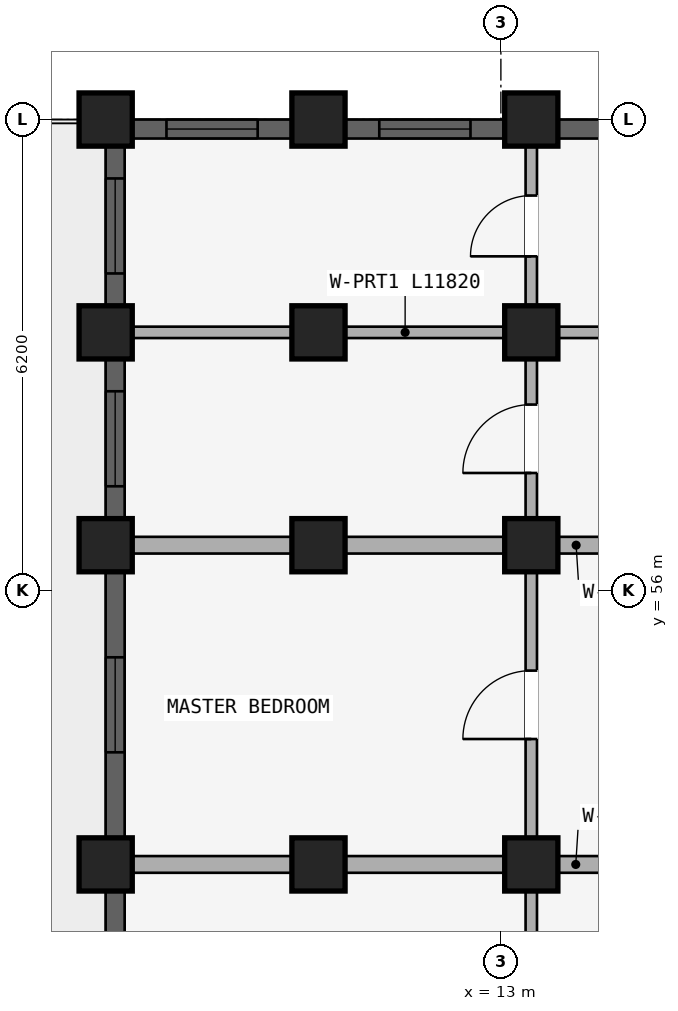
"""IFC4 building model, lengths in metres.
Left out: names, types, materials, properties, quantities, classifications, styles, units other than length and angle.
Written with IfcOpenShell. Run it as: python <this file> out.ifc"""

import sys

from ifc_helpers import new_model, si_unit, direction, frame, frame_2d, origin, origin_2d, place, context, subcontext, project, spatial, rectangle, extrude, element, fill, save


model = new_model("IFC4")
c1 = context("Model", 3, precision=1e-05, world=origin(), true_north=direction((0.0, 1.0)))
c2 = subcontext(c1, "Body", "Model", "MODEL_VIEW")
j1 = project(units=[si_unit("LENGTHUNIT", "METRE"), si_unit("PLANEANGLEUNIT", "RADIAN")], contexts=[c1])
p1 = place(None, origin())
s1 = spatial("IfcSite", under=j1, at=p1, CompositionType="ELEMENT")
p2 = place(p1, origin())
s2 = spatial("IfcBuilding", under=s1, at=p2, CompositionType="ELEMENT")
p3 = place(p2, frame((0.0, 0.0, 24.45)))
s3 = spatial("IfcBuildingStorey", under=s2, at=p3, CompositionType="ELEMENT", Elevation=24.45)
for number, where, z_axis, x_axis in (
    (1, (13.4, 52.4, 0.0), (0.0, 0.0, 1.0), (1.0, 0.0, 0.0)),
    (2, (10.6, 52.4, 0.0), (0.0, 0.0, 1.0), (1.0, 0.0, 0.0)),
):
    element("IfcColumn", number, at=place(p3, frame(where, z_axis=z_axis, x_axis=x_axis)), inside=s3, PredefinedType="COLUMN", context=c2, shape_type="SweptSolid", body=[
        extrude(rectangle(XDim=0.7, YDim=0.7, at=origin_2d()), origin(), (0.0, 0.0, 1.0), 2.93),
    ])
p4 = place(p3, frame((7.8, 52.4, 0.0), z_axis=(0.0, 0.0, 1.0), x_axis=(1.0, 0.0, 0.0)))
e3 = element("IfcColumn", 3, at=p4, inside=s3, PredefinedType="COLUMN", context=c2, shape_type="SweptSolid", body=[
    extrude(rectangle(XDim=0.7, YDim=0.7, at=origin_2d()), origin(), (0.0, 0.0, 1.0), 2.97),
])
for number, where, z_axis, x_axis in (
    (4, (13.4, 56.6, 0.0), (0.0, 0.0, 1.0), (1.0, 0.0, 0.0)),
    (5, (10.6, 56.6, 0.0), (0.0, 0.0, 1.0), (1.0, 0.0, 0.0)),
):
    element("IfcColumn", number, at=place(p3, frame(where, z_axis=z_axis, x_axis=x_axis)), inside=s3, PredefinedType="COLUMN", context=c2, shape_type="SweptSolid", body=[
        extrude(rectangle(XDim=0.7, YDim=0.7, at=origin_2d()), origin(), (0.0, 0.0, 1.0), 2.93),
    ])
p5 = place(p3, frame((7.8, 56.6, 0.0), z_axis=(0.0, 0.0, 1.0), x_axis=(1.0, 0.0, 0.0)))
e6 = element("IfcColumn", 6, at=p5, inside=s3, PredefinedType="COLUMN", context=c2, shape_type="SweptSolid", body=[
    extrude(rectangle(XDim=0.7, YDim=0.7, at=origin_2d()), origin(), (0.0, 0.0, 1.0), 2.97),
])
for number, where, z_axis, x_axis in (
    (7, (13.4, 59.4, 0.0), (0.0, 0.0, 1.0), (1.0, 0.0, 0.0)),
    (8, (10.6, 59.4, 0.0), (0.0, 0.0, 1.0), (1.0, 0.0, 0.0)),
):
    element("IfcColumn", number, at=place(p3, frame(where, z_axis=z_axis, x_axis=x_axis)), inside=s3, PredefinedType="COLUMN", context=c2, shape_type="SweptSolid", body=[
        extrude(rectangle(XDim=0.7, YDim=0.7, at=origin_2d()), origin(), (0.0, 0.0, 1.0), 2.93),
    ])
p6 = place(p3, frame((7.8, 59.4, 0.0), z_axis=(0.0, 0.0, 1.0), x_axis=(1.0, 0.0, 0.0)))
e9 = element("IfcColumn", 9, at=p6, inside=s3, PredefinedType="COLUMN", context=c2, shape_type="SweptSolid", body=[
    extrude(rectangle(XDim=0.7, YDim=0.7, at=origin_2d()), origin(), (0.0, 0.0, 1.0), 2.97),
])
for number, where, z_axis, x_axis in (
    (10, (13.4, 62.2, 0.0), (0.0, 0.0, 1.0), (1.0, 0.0, 0.0)),
    (11, (10.6, 62.2, 0.0), (0.0, 0.0, 1.0), (1.0, 0.0, 0.0)),
):
    element("IfcColumn", number, at=place(p3, frame(where, z_axis=z_axis, x_axis=x_axis)), inside=s3, PredefinedType="COLUMN", context=c2, shape_type="SweptSolid", body=[
        extrude(rectangle(XDim=0.7, YDim=0.7, at=origin_2d()), origin(), (0.0, 0.0, 1.0), 2.93),
    ])
p7 = place(p3, frame((7.8, 62.2, 0.0), z_axis=(0.0, 0.0, 1.0), x_axis=(1.0, 0.0, 0.0)))
e12 = element("IfcColumn", 12, at=p7, inside=s3, PredefinedType="COLUMN", context=c2, shape_type="SweptSolid", body=[
    extrude(rectangle(XDim=0.7, YDim=0.7, at=origin_2d()), origin(), (0.0, 0.0, 1.0), 2.97),
])
p8 = place(p3, frame((13.4, 48.43, 0.0), z_axis=(0.0, 0.0, 1.0), x_axis=(0.0, 1.0, 0.0)))
e13 = element("IfcWall", 13, at=p8, inside=s3, PredefinedType="PARTITIONING", context=c2, shape_type="SweptSolid", body=[
    extrude(rectangle(XDim=3.89, YDim=0.15, at=frame_2d((1.945, 0.0))), origin(), (0.0, 0.0, 1.0), 2.372),
])
p9 = place(p8, frame((1.495, 0.0, 0.0)))
e14 = element("IfcOpeningElement", 14, at=p9, cuts=e13, PredefinedType="OPENING", context=c2, shape_type="SweptSolid", body=[
    extrude(rectangle(XDim=0.9, YDim=2.1, at=frame_2d((0.45, 1.05))), frame((0.0, 0.085, 0.0), z_axis=(0.0, -1.0, 0.0), x_axis=(1.0, 0.0, 0.0)), (0.0, 0.0, 1.0), 0.17),
])
p10 = place(p3, frame((13.4, 52.48, 0.0), z_axis=(0.0, 0.0, 1.0), x_axis=(0.0, 1.0, 0.0)))
e15 = element("IfcWall", 15, at=p10, inside=s3, PredefinedType="PARTITIONING", context=c2, shape_type="SweptSolid", body=[
    extrude(rectangle(XDim=4.04, YDim=0.15, at=frame_2d((2.02, 0.0))), origin(), (0.0, 0.0, 1.0), 2.372),
])
p11 = place(p10, frame((1.57, 0.0, 0.0)))
e16 = element("IfcOpeningElement", 16, at=p11, cuts=e15, PredefinedType="OPENING", context=c2, shape_type="SweptSolid", body=[
    extrude(rectangle(XDim=0.9, YDim=2.1, at=frame_2d((0.45, 1.05))), frame((0.0, 0.085, 0.0), z_axis=(0.0, -1.0, 0.0), x_axis=(1.0, 0.0, 0.0)), (0.0, 0.0, 1.0), 0.17),
])
p12 = place(p3, frame((19.95, 52.4, 0.0), z_axis=(0.0, 0.0, 1.0), x_axis=(-1.0, 0.0, 0.0)))
e17 = element("IfcWall", 17, at=p12, inside=s3, PredefinedType="STANDARD", context=c2, shape_type="SweptSolid", body=[
    extrude(rectangle(XDim=11.93, YDim=0.22, at=frame_2d((5.965, 0.0))), origin(), (0.0, 0.0, 1.0), 2.372),
])
p13 = place(p3, frame((13.4, 56.68, 0.0), z_axis=(0.0, 0.0, 1.0), x_axis=(0.0, 1.0, 0.0)))
e18 = element("IfcWall", 18, at=p13, inside=s3, PredefinedType="PLUMBINGWALL", context=c2, shape_type="SweptSolid", body=[
    extrude(rectangle(XDim=2.64, YDim=0.15, at=frame_2d((1.32, 0.0))), origin(), (0.0, 0.0, 1.0), 2.372),
])
p14 = place(p13, frame((0.87, 0.0, 0.0)))
e19 = element("IfcOpeningElement", 19, at=p14, cuts=e18, PredefinedType="OPENING", context=c2, shape_type="SweptSolid", body=[
    extrude(rectangle(XDim=0.9, YDim=2.1, at=frame_2d((0.45, 1.05))), frame((0.0, 0.085, 0.0), z_axis=(0.0, -1.0, 0.0), x_axis=(1.0, 0.0, 0.0)), (0.0, 0.0, 1.0), 0.17),
])
p15 = place(p3, frame((19.9, 56.6, 0.0), z_axis=(0.0, 0.0, 1.0), x_axis=(-1.0, 0.0, 0.0)))
e20 = element("IfcWall", 20, at=p15, inside=s3, PredefinedType="STANDARD", context=c2, shape_type="SweptSolid", body=[
    extrude(rectangle(XDim=11.82, YDim=0.22, at=frame_2d((5.91, 0.0))), origin(), (0.0, 0.0, 1.0), 2.372),
])
p16 = place(p3, frame((13.4, 59.48, 0.0), z_axis=(0.0, 0.0, 1.0), x_axis=(0.0, 1.0, 0.0)))
e21 = element("IfcWall", 21, at=p16, inside=s3, PredefinedType="PLUMBINGWALL", context=c2, shape_type="SweptSolid", body=[
    extrude(rectangle(XDim=2.64, YDim=0.15, at=frame_2d((1.32, 0.0))), origin(), (0.0, 0.0, 1.0), 2.372),
])
p17 = place(p16, frame((0.92, 0.0, 0.0)))
e22 = element("IfcOpeningElement", 22, at=p17, cuts=e21, PredefinedType="OPENING", context=c2, shape_type="SweptSolid", body=[
    extrude(rectangle(XDim=0.8, YDim=2.1, at=frame_2d((0.4, 1.05))), frame((0.0, 0.085, 0.0), z_axis=(0.0, -1.0, 0.0), x_axis=(1.0, 0.0, 0.0)), (0.0, 0.0, 1.0), 0.17),
])
p18 = place(p3, frame((19.9, 59.4, 0.0), z_axis=(0.0, 0.0, 1.0), x_axis=(-1.0, 0.0, 0.0)))
e23 = element("IfcWall", 23, at=p18, inside=s3, PredefinedType="PARTITIONING", context=c2, shape_type="SweptSolid", body=[
    extrude(rectangle(XDim=11.82, YDim=0.15, at=frame_2d((5.91, 0.0))), origin(), (0.0, 0.0, 1.0), 2.372),
])
p19 = place(p18, frame((2.75, 0.0, 0.0)))
e24 = element("IfcOpeningElement", 24, at=p19, cuts=e23, PredefinedType="OPENING", context=c2, shape_type="SweptSolid", body=[
    extrude(rectangle(XDim=0.9, YDim=2.1, at=frame_2d((0.45, 1.05))), frame((0.0, 0.085, 0.0), z_axis=(0.0, -1.0, 0.0), x_axis=(1.0, 0.0, 0.0)), (0.0, 0.0, 1.0), 0.17),
])
p20 = place(p3, frame((7.925, 48.553, 0.0), z_axis=(0.0, 0.0, 1.0), x_axis=(0.0, 1.0, 0.0)))
e25 = element("IfcWall", 25, at=p20, inside=s3, PredefinedType="STANDARD", context=c2, shape_type="SweptSolid", body=[
    extrude(rectangle(XDim=3.493, YDim=0.25, at=frame_2d((1.747, 0.0))), origin(), (0.0, 0.0, 1.0), 2.48),
])
p21 = place(p20, frame((1.122, 0.0, 0.73)))
e26 = element("IfcOpeningElement", 26, at=p21, cuts=e25, PredefinedType="OPENING", context=c2, shape_type="SweptSolid", body=[
    extrude(rectangle(XDim=1.25, YDim=1.55, at=frame_2d((0.625, 0.775))), frame((0.0, 0.135, 0.0), z_axis=(0.0, -1.0, 0.0), x_axis=(1.0, 0.0, 0.0)), (0.0, 0.0, 1.0), 0.27),
])
p22 = place(p3, frame((7.925, 52.753, 0.0), z_axis=(0.0, 0.0, 1.0), x_axis=(0.0, 1.0, 0.0)))
e27 = element("IfcWall", 27, at=p22, inside=s3, PredefinedType="STANDARD", context=c2, shape_type="SweptSolid", body=[
    extrude(rectangle(XDim=3.493, YDim=0.25, at=frame_2d((1.747, 0.0))), origin(), (0.0, 0.0, 1.0), 2.48),
])
p23 = place(p22, frame((1.122, 0.0, 0.73)))
e28 = element("IfcOpeningElement", 28, at=p23, cuts=e27, PredefinedType="OPENING", context=c2, shape_type="SweptSolid", body=[
    extrude(rectangle(XDim=1.25, YDim=1.55, at=frame_2d((0.625, 0.775))), frame((0.0, 0.135, 0.0), z_axis=(0.0, -1.0, 0.0), x_axis=(1.0, 0.0, 0.0)), (0.0, 0.0, 1.0), 0.27),
])
p24 = place(p3, frame((7.925, 56.954, 0.0), z_axis=(0.0, 0.0, 1.0), x_axis=(0.0, 1.0, 0.0)))
e29 = element("IfcWall", 29, at=p24, inside=s3, PredefinedType="STANDARD", context=c2, shape_type="SweptSolid", body=[
    extrude(rectangle(XDim=2.093, YDim=0.25, at=frame_2d((1.046, 0.0))), origin(), (0.0, 0.0, 1.0), 2.48),
])
p25 = place(p24, frame((0.421, 0.0, 0.73)))
e30 = element("IfcOpeningElement", 30, at=p25, cuts=e29, PredefinedType="OPENING", context=c2, shape_type="SweptSolid", body=[
    extrude(rectangle(XDim=1.25, YDim=1.55, at=frame_2d((0.625, 0.775))), frame((0.0, 0.135, 0.0), z_axis=(0.0, -1.0, 0.0), x_axis=(1.0, 0.0, 0.0)), (0.0, 0.0, 1.0), 0.27),
])
p26 = place(p3, frame((7.925, 59.753, 0.0), z_axis=(0.0, 0.0, 1.0), x_axis=(0.0, 1.0, 0.0)))
e31 = element("IfcWall", 31, at=p26, inside=s3, PredefinedType="STANDARD", context=c2, shape_type="SweptSolid", body=[
    extrude(rectangle(XDim=2.093, YDim=0.25, at=frame_2d((1.046, 0.0))), origin(), (0.0, 0.0, 1.0), 2.48),
])
p27 = place(p26, frame((0.421, 0.0, 0.73)))
e32 = element("IfcOpeningElement", 32, at=p27, cuts=e31, PredefinedType="OPENING", context=c2, shape_type="SweptSolid", body=[
    extrude(rectangle(XDim=1.25, YDim=1.55, at=frame_2d((0.625, 0.775))), frame((0.0, 0.135, 0.0), z_axis=(0.0, -1.0, 0.0), x_axis=(1.0, 0.0, 0.0)), (0.0, 0.0, 1.0), 0.27),
])
p28 = place(p3, frame((19.771, 62.075, 0.0), z_axis=(0.0, 0.0, 1.0), x_axis=(-1.0, 0.0, 0.0)))
e33 = element("IfcWall", 33, at=p28, inside=s3, PredefinedType="STANDARD", context=c2, shape_type="SweptSolid", body=[
    extrude(rectangle(XDim=6.018, YDim=0.25, at=frame_2d((3.009, 0.0))), origin(), (0.0, 0.0, 1.0), 2.372),
])
p29 = place(p28, frame((2.322, 0.0, 0.522)))
e34 = element("IfcOpeningElement", 34, at=p29, cuts=e33, PredefinedType="OPENING", context=c2, shape_type="SweptSolid", body=[
    extrude(rectangle(XDim=1.5, YDim=1.65, at=frame_2d((0.75, 0.825))), frame((0.0, 0.135, 0.0), z_axis=(0.0, -1.0, 0.0), x_axis=(1.0, 0.0, 0.0)), (0.0, 0.0, 1.0), 0.27),
])
p30 = place(p3, frame((13.046, 62.075, 0.0), z_axis=(0.0, 0.0, 1.0), x_axis=(-1.0, 0.0, 0.0)))
e35 = element("IfcWall", 35, at=p30, inside=s3, PredefinedType="STANDARD", context=c2, shape_type="SweptSolid", body=[
    extrude(rectangle(XDim=2.093, YDim=0.25, at=frame_2d((1.046, 0.0))), origin(), (0.0, 0.0, 1.0), 2.372),
])
p31 = place(p30, frame((0.447, 0.0, 0.672)))
e36 = element("IfcOpeningElement", 36, at=p31, cuts=e35, PredefinedType="OPENING", context=c2, shape_type="SweptSolid", body=[
    extrude(rectangle(XDim=1.2, YDim=1.5, at=frame_2d((0.6, 0.75))), frame((0.0, 0.135, 0.0), z_axis=(0.0, -1.0, 0.0), x_axis=(1.0, 0.0, 0.0)), (0.0, 0.0, 1.0), 0.27),
])
p32 = place(p3, frame((10.247, 62.075, 0.0), z_axis=(0.0, 0.0, 1.0), x_axis=(-1.0, 0.0, 0.0)))
e37 = element("IfcWall", 37, at=p32, inside=s3, PredefinedType="STANDARD", context=c2, shape_type="SweptSolid", body=[
    extrude(rectangle(XDim=2.093, YDim=0.25, at=frame_2d((1.046, 0.0))), origin(), (0.0, 0.0, 1.0), 2.412),
])
p33 = place(p32, frame((0.447, 0.0, 0.712)))
e38 = element("IfcOpeningElement", 38, at=p33, cuts=e37, PredefinedType="OPENING", context=c2, shape_type="SweptSolid", body=[
    extrude(rectangle(XDim=1.2, YDim=1.5, at=frame_2d((0.6, 0.75))), frame((0.0, 0.135, 0.0), z_axis=(0.0, -1.0, 0.0), x_axis=(1.0, 0.0, 0.0)), (0.0, 0.0, 1.0), 0.27),
])
p34 = place(p23, origin())
e39 = element("IfcWindow", 39, at=p34, inside=s3, PartitioningType="SINGLE_PANEL", PredefinedType="WINDOW", context=c2, shape_type="SweptSolid", body=[
    extrude(rectangle(XDim=1.25, YDim=1.55, at=frame_2d((0.625, 0.775))), frame((0.0, 0.03, 0.0), z_axis=(0.0, -1.0, 0.0), x_axis=(1.0, 0.0, 0.0)), (0.0, 0.0, 1.0), 0.06),
])
fill(e28, e39)
p35 = place(p25, origin())
e40 = element("IfcWindow", 40, at=p35, inside=s3, PartitioningType="SINGLE_PANEL", PredefinedType="WINDOW", context=c2, shape_type="SweptSolid", body=[
    extrude(rectangle(XDim=1.25, YDim=1.55, at=frame_2d((0.625, 0.775))), frame((0.0, 0.03, 0.0), z_axis=(0.0, -1.0, 0.0), x_axis=(1.0, 0.0, 0.0)), (0.0, 0.0, 1.0), 0.06),
])
fill(e30, e40)
p36 = place(p27, origin())
e41 = element("IfcWindow", 41, at=p36, inside=s3, PartitioningType="SINGLE_PANEL", PredefinedType="WINDOW", context=c2, shape_type="SweptSolid", body=[
    extrude(rectangle(XDim=1.25, YDim=1.55, at=frame_2d((0.625, 0.775))), frame((0.0, 0.03, 0.0), z_axis=(0.0, -1.0, 0.0), x_axis=(1.0, 0.0, 0.0)), (0.0, 0.0, 1.0), 0.06),
])
fill(e32, e41)
p37 = place(p31, origin())
e42 = element("IfcWindow", 42, at=p37, inside=s3, PartitioningType="SINGLE_PANEL", PredefinedType="WINDOW", context=c2, shape_type="SweptSolid", body=[
    extrude(rectangle(XDim=1.2, YDim=1.5, at=frame_2d((0.6, 0.75))), frame((0.0, 0.03, 0.0), z_axis=(0.0, -1.0, 0.0), x_axis=(1.0, 0.0, 0.0)), (0.0, 0.0, 1.0), 0.06),
])
fill(e36, e42)
p38 = place(p33, origin())
e43 = element("IfcWindow", 43, at=p38, inside=s3, PartitioningType="SINGLE_PANEL", PredefinedType="WINDOW", context=c2, shape_type="SweptSolid", body=[
    extrude(rectangle(XDim=1.2, YDim=1.5, at=frame_2d((0.6, 0.75))), frame((0.0, 0.03, 0.0), z_axis=(0.0, -1.0, 0.0), x_axis=(1.0, 0.0, 0.0)), (0.0, 0.0, 1.0), 0.06),
])
fill(e38, e43)
p39 = place(p11, frame((0.9, 0.0, 0.0), z_axis=(0.0, 0.0, 1.0), x_axis=(-1.0, 0.0, 0.0)))
e44 = element("IfcDoor", 44, at=p39, inside=s3, OperationType="SINGLE_SWING_RIGHT", PredefinedType="DOOR", context=c2, shape_type="SweptSolid", body=[
    extrude(rectangle(XDim=0.9, YDim=2.1, at=frame_2d((0.45, 1.05))), frame((0.0, 0.025, 0.0), z_axis=(0.0, -1.0, 0.0), x_axis=(1.0, 0.0, 0.0)), (0.0, 0.0, 1.0), 0.05),
])
fill(e16, e44)
p40 = place(p14, frame((0.9, 0.0, 0.0), z_axis=(0.0, 0.0, 1.0), x_axis=(-1.0, 0.0, 0.0)))
e45 = element("IfcDoor", 45, at=p40, inside=s3, OperationType="SINGLE_SWING_RIGHT", PredefinedType="DOOR", context=c2, shape_type="SweptSolid", body=[
    extrude(rectangle(XDim=0.9, YDim=2.1, at=frame_2d((0.45, 1.05))), frame((0.0, 0.025, 0.0), z_axis=(0.0, -1.0, 0.0), x_axis=(1.0, 0.0, 0.0)), (0.0, 0.0, 1.0), 0.05),
])
fill(e19, e45)
p41 = place(p17, frame((0.8, 0.0, 0.0), z_axis=(0.0, 0.0, 1.0), x_axis=(-1.0, 0.0, 0.0)))
e46 = element("IfcDoor", 46, at=p41, inside=s3, OperationType="SINGLE_SWING_RIGHT", PredefinedType="DOOR", context=c2, shape_type="SweptSolid", body=[
    extrude(rectangle(XDim=0.8, YDim=2.1, at=frame_2d((0.4, 1.05))), frame((0.0, 0.025, 0.0), z_axis=(0.0, -1.0, 0.0), x_axis=(1.0, 0.0, 0.0)), (0.0, 0.0, 1.0), 0.05),
])
fill(e22, e46)
save(model, sys.argv[1])
